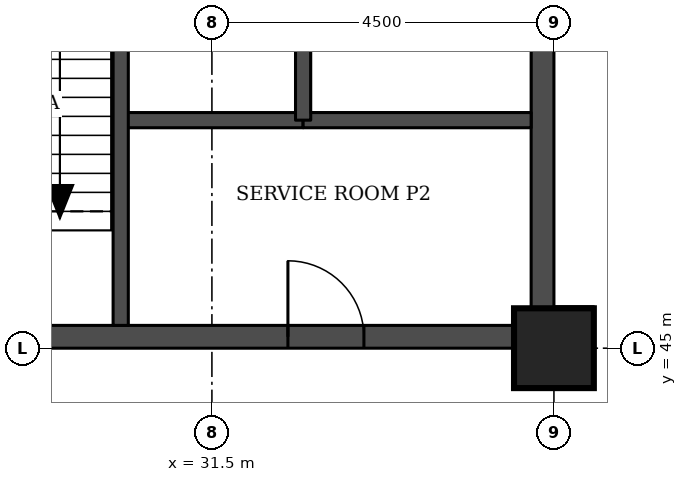
"""IFC4 building model, lengths in metres.
Left out: names, types, materials, properties, quantities, classifications, styles, units other than length and angle.
Written with IfcOpenShell. Run it as: python <this file> out.ifc"""

import sys

from ifc_helpers import new_model, si_unit, direction, frame, frame_2d, origin, origin_2d, place, context, subcontext, project, spatial, rectangle, extrude, element, fill, save


model = new_model("IFC4")
c1 = context("Model", 3, precision=1e-05, world=origin(), true_north=direction((0.0, 1.0)))
c2 = subcontext(c1, "Body", "Model", "MODEL_VIEW")
j1 = project(units=[si_unit("LENGTHUNIT", "METRE"), si_unit("PLANEANGLEUNIT", "RADIAN")], contexts=[c1])
p1 = place(None, origin())
s1 = spatial("IfcSite", under=j1, at=p1, CompositionType="ELEMENT")
p2 = place(p1, origin())
s2 = spatial("IfcBuilding", under=s1, at=p2, CompositionType="ELEMENT")
p3 = place(p2, frame((0.0, 0.0, 108.5)))
s3 = spatial("IfcBuildingStorey", under=s2, at=p3, CompositionType="ELEMENT", Elevation=108.5)
p4 = place(p3, frame((36.0, 45.0, 0.0), z_axis=(0.0, 0.0, 1.0), x_axis=(1.0, 0.0, 0.0)))
e1 = element("IfcColumn", 1, at=p4, inside=s3, PredefinedType="COLUMN", context=c2, shape_type="SweptSolid", body=[
    extrude(rectangle(XDim=1.05, YDim=1.05, at=origin_2d()), origin(), (0.0, 0.0, 1.0), 3.7),
])
p5 = place(p3, frame((27.3, 45.15, 0.0), z_axis=(0.0, 0.0, 1.0), x_axis=(1.0, 0.0, 0.0)))
e2 = element("IfcWall", 2, at=p5, inside=s3, PredefinedType="SHEAR", context=c2, shape_type="SweptSolid", body=[
    extrude(rectangle(XDim=8.4, YDim=0.3, at=frame_2d((4.2, 0.0))), origin(), (0.0, 0.0, 1.0), 3.7),
])
p6 = place(p5, frame((5.2, 0.0, 0.0)))
e3 = element("IfcOpeningElement", 3, at=p6, cuts=e2, PredefinedType="OPENING", context=c2, shape_type="SweptSolid", body=[
    extrude(rectangle(XDim=1.0, YDim=2.1, at=frame_2d((0.5, 1.05))), frame((0.0, 0.16, 0.0), z_axis=(0.0, -1.0, 0.0), x_axis=(1.0, 0.0, 0.0)), (0.0, 0.0, 1.0), 0.32),
])
p7 = place(p3, frame((35.85, 45.0, 0.0), z_axis=(0.0, 0.0, 1.0), x_axis=(0.0, 1.0, 0.0)))
e4 = element("IfcWall", 4, at=p7, inside=s3, PredefinedType="SHEAR", context=c2, shape_type="SweptSolid", body=[
    extrude(rectangle(XDim=9.0, YDim=0.3, at=frame_2d((4.5, 0.0))), origin(), (0.0, 0.0, 1.0), 3.7),
])
p8 = place(p3, frame((30.3, 48.0, 0.0), z_axis=(0.0, 0.0, 1.0), x_axis=(1.0, 0.0, 0.0)))
e5 = element("IfcWall", 5, at=p8, inside=s3, PredefinedType="SOLIDWALL", context=c2, shape_type="SweptSolid", body=[
    extrude(rectangle(XDim=2.4, YDim=0.2, at=frame_2d((1.2, 0.0))), origin(), (0.0, 0.0, 1.0), 3.55),
])
p9 = place(p3, frame((32.7, 48.0, 0.0), z_axis=(0.0, 0.0, 1.0), x_axis=(1.0, 0.0, 0.0)))
e6 = element("IfcWall", 6, at=p9, inside=s3, PredefinedType="SOLIDWALL", context=c2, shape_type="SweptSolid", body=[
    extrude(rectangle(XDim=3.0, YDim=0.2, at=frame_2d((1.5, 0.0))), origin(), (0.0, 0.0, 1.0), 3.55),
])
for number, where, z_axis, x_axis in (
    (7, (30.3, 45.3, 0.0), (0.0, 0.0, 1.0), (0.0, 1.0, 0.0)),
    (8, (32.7, 48.0, 0.0), (0.0, 0.0, 1.0), (0.0, 1.0, 0.0)),
):
    element("IfcWall", number, at=place(p3, frame(where, z_axis=z_axis, x_axis=x_axis)), inside=s3, PredefinedType="SOLIDWALL", context=c2, shape_type="SweptSolid", body=[
        extrude(rectangle(XDim=5.7, YDim=0.2, at=frame_2d((2.85, 0.0))), origin(), (0.0, 0.0, 1.0), 3.55),
    ])
p10 = place(p6, origin())
e9 = element("IfcDoor", 9, at=p10, inside=s3, OperationType="SINGLE_SWING_LEFT", PredefinedType="DOOR", context=c2, shape_type="SweptSolid", body=[
    extrude(rectangle(XDim=1.0, YDim=2.1, at=frame_2d((0.5, 1.05))), frame((0.0, 0.025, 0.0), z_axis=(0.0, -1.0, 0.0), x_axis=(1.0, 0.0, 0.0)), (0.0, 0.0, 1.0), 0.05),
])
fill(e3, e9)
save(model, sys.argv[1])
